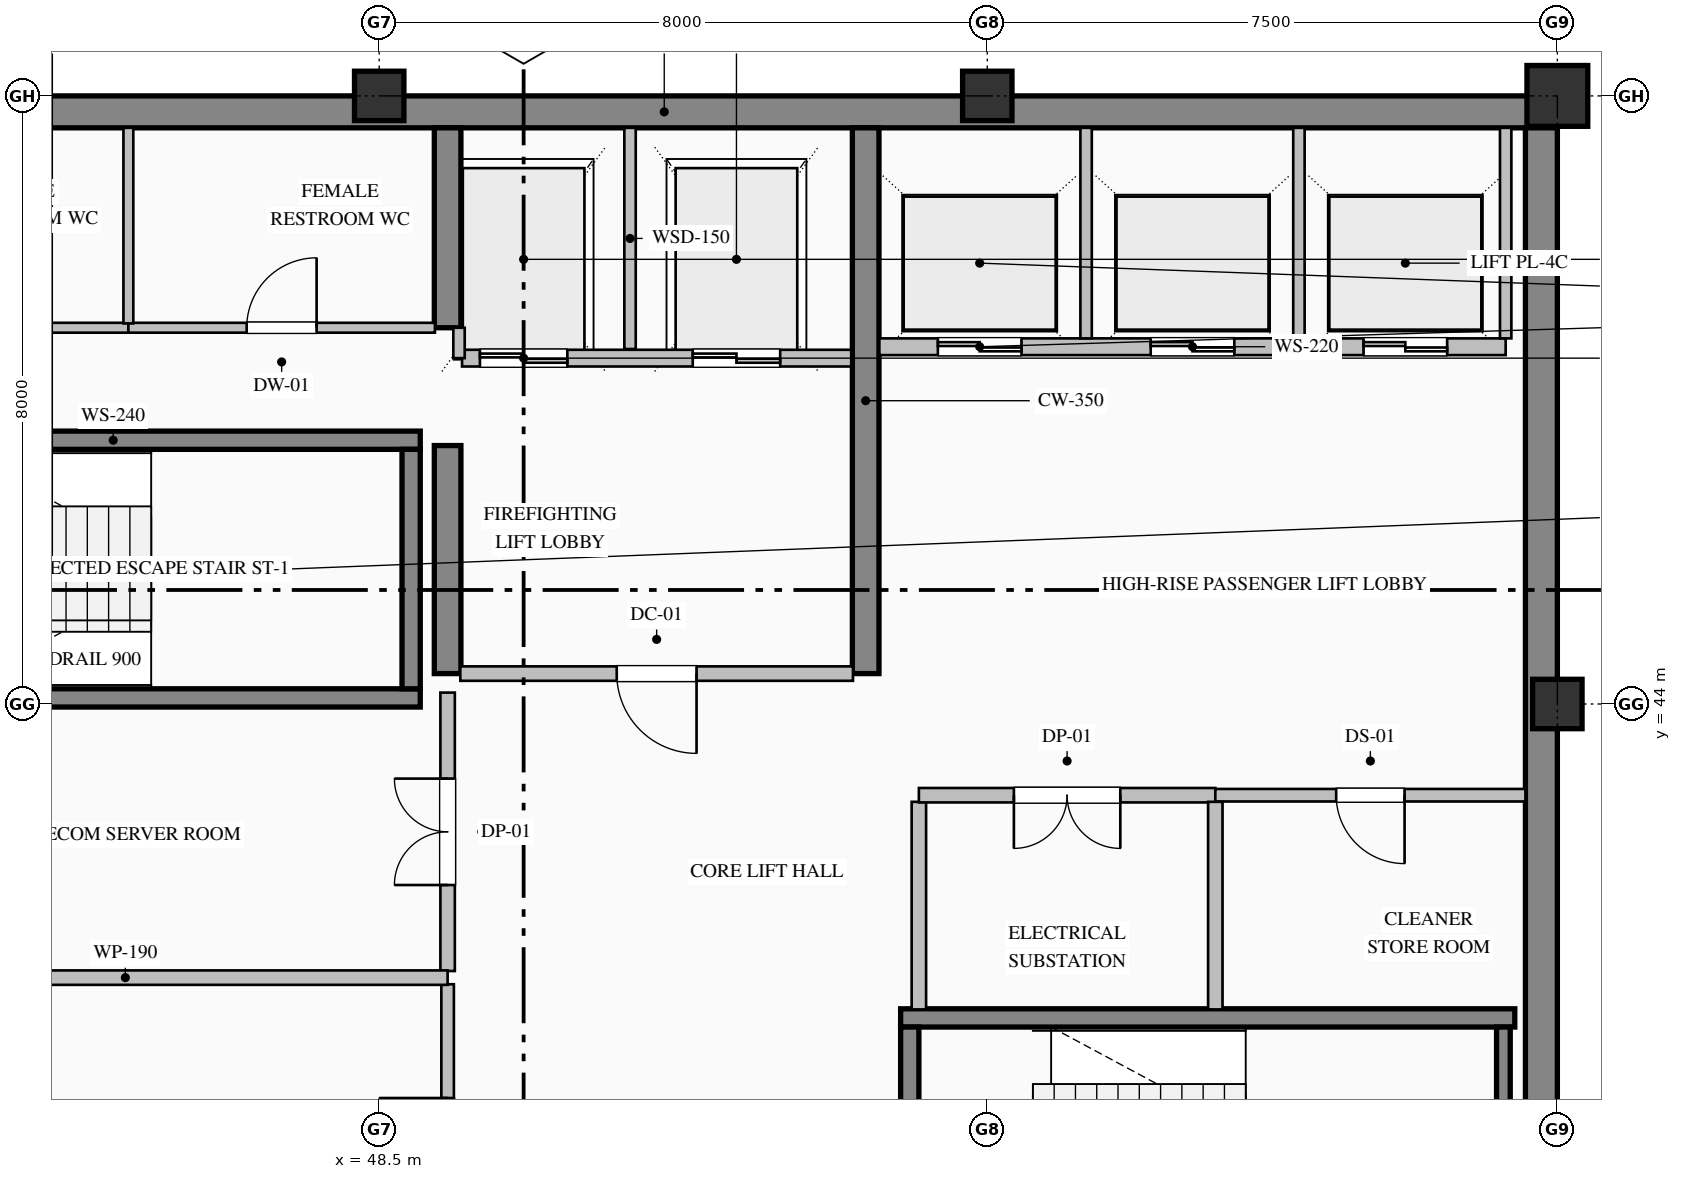
"""IFC4 building model, lengths in metres.
Left out: names, types, materials, properties, quantities, classifications, styles, units other than length and angle.
Written with IfcOpenShell. Run it as: python <this file> out.ifc"""

import sys

from ifc_helpers import new_model, si_unit, direction, frame, frame_2d, origin, origin_2d, place, context, subcontext, project, spatial, rectangle, hollow_rectangle, extrude, element, fill, save


model = new_model("IFC4")
c1 = context("Model", 3, precision=1e-05, world=origin(), true_north=direction((0.0, 1.0)))
c2 = subcontext(c1, "Body", "Model", "MODEL_VIEW")
j1 = project(units=[si_unit("LENGTHUNIT", "METRE"), si_unit("PLANEANGLEUNIT", "RADIAN")], contexts=[c1])
p1 = place(None, origin())
s1 = spatial("IfcSite", under=j1, at=p1, CompositionType="ELEMENT")
p2 = place(p1, origin())
s2 = spatial("IfcBuilding", under=s1, at=p2, CompositionType="ELEMENT")
p3 = place(p2, frame((0.0, 0.0, 347.2)))
s3 = spatial("IfcBuildingStorey", under=s2, at=p3, CompositionType="ELEMENT", Elevation=347.2)
p4 = place(p3, frame((40.5, 51.79, 0.0), z_axis=(0.0, 0.0, 1.0), x_axis=(1.0, 0.0, 0.0)))
e1 = element("IfcWall", 1, at=p4, inside=s3, PredefinedType="SHEAR", context=c2, shape_type="SweptSolid", body=[
    extrude(rectangle(XDim=23.5, YDim=0.42, at=frame_2d((11.75, 0.0))), origin(), (0.0, 0.0, 1.0), 3.785),
])
p5 = place(p3, frame((63.79, 36.32, 0.0), z_axis=(0.0, 0.0, 1.0), x_axis=(0.0, 1.0, 0.0)))
e2 = element("IfcWall", 2, at=p5, inside=s3, PredefinedType="SHEAR", context=c2, shape_type="SweptSolid", body=[
    extrude(rectangle(XDim=15.26, YDim=0.42, at=frame_2d((7.63, 0.0))), origin(), (0.0, 0.0, 1.0), 3.785),
])
p6 = place(p3, frame((49.4, 44.4, 0.0), z_axis=(0.0, 0.0, 1.0), x_axis=(0.0, 1.0, 0.0)))
e3 = element("IfcWall", 3, at=p6, inside=s3, PredefinedType="SHEAR", context=c2, shape_type="SweptSolid", body=[
    extrude(rectangle(XDim=3.0, YDim=0.35, at=frame_2d((1.5, 0.0))), origin(), (0.0, 0.0, 1.0), 3.785),
])
p7 = place(p3, frame((49.4, 48.95, 0.0), z_axis=(0.0, 0.0, 1.0), x_axis=(0.0, 1.0, 0.0)))
e4 = element("IfcWall", 4, at=p7, inside=s3, PredefinedType="SHEAR", context=c2, shape_type="SweptSolid", body=[
    extrude(rectangle(XDim=2.63, YDim=0.35, at=frame_2d((1.315, 0.0))), origin(), (0.0, 0.0, 1.0), 3.785),
])
p8 = place(p3, frame((54.9, 44.4, 0.0), z_axis=(0.0, 0.0, 1.0), x_axis=(0.0, 1.0, 0.0)))
e5 = element("IfcWall", 5, at=p8, inside=s3, PredefinedType="SHEAR", context=c2, shape_type="SweptSolid", body=[
    extrude(rectangle(XDim=7.18, YDim=0.35, at=frame_2d((3.59, 0.0))), origin(), (0.0, 0.0, 1.0), 3.785),
])
for number, where, z_axis, x_axis in (
    (6, (48.5, 52.0, 0.0), (0.0, 0.0, 1.0), (1.0, 0.0, 0.0)),
    (7, (56.5, 52.0, 0.0), (0.0, 0.0, 1.0), (1.0, 0.0, 0.0)),
    (8, (64.0, 44.0, 0.0), (0.0, 0.0, 1.0), (1.0, 0.0, 0.0)),
):
    element("IfcColumn", number, at=place(p3, frame(where, z_axis=z_axis, x_axis=x_axis)), inside=s3, PredefinedType="COLUMN", context=c2, shape_type="SweptSolid", body=[
        extrude(hollow_rectangle(XDim=0.65, YDim=0.65, WallThickness=0.028, at=origin_2d()), origin(), (0.0, 0.0, 1.0), 4.0),
    ])
p9 = place(p3, frame((64.0, 52.0, 0.0), z_axis=(0.0, 0.0, 1.0), x_axis=(1.0, 0.0, 0.0)))
e9 = element("IfcColumn", 9, at=p9, inside=s3, PredefinedType="COLUMN", context=c2, shape_type="SweptSolid", body=[
    extrude(hollow_rectangle(XDim=0.8, YDim=0.8, WallThickness=0.032, at=origin_2d()), origin(), (0.0, 0.0, 1.0), 4.0),
])
for number, where, z_axis, x_axis in (
    (10, (40.96, 47.47, 0.0), (0.0, 0.0, 1.0), (1.0, 0.0, 0.0)),
    (11, (49.04, 44.08, 0.0), (0.0, 0.0, 1.0), (-1.0, 0.0, 0.0)),
):
    element("IfcWall", number, at=place(p3, frame(where, z_axis=z_axis, x_axis=x_axis)), inside=s3, PredefinedType="SOLIDWALL", context=c2, shape_type="SweptSolid", body=[
        extrude(rectangle(XDim=8.08, YDim=0.24, at=frame_2d((4.04, 0.0))), origin(), (0.0, 0.0, 1.0), 4.0),
    ])
p10 = place(p3, frame((48.92, 44.2, 0.0), z_axis=(0.0, 0.0, 1.0), x_axis=(0.0, 1.0, 0.0)))
e12 = element("IfcWall", 12, at=p10, inside=s3, PredefinedType="SOLIDWALL", context=c2, shape_type="SweptSolid", body=[
    extrude(rectangle(XDim=3.15, YDim=0.24, at=frame_2d((1.575, 0.0))), origin(), (0.0, 0.0, 1.0), 4.0),
])
p11 = place(p3, frame((55.36, 39.87, 0.0), z_axis=(0.0, 0.0, 1.0), x_axis=(1.0, 0.0, 0.0)))
e13 = element("IfcWall", 13, at=p11, inside=s3, PredefinedType="SOLIDWALL", context=c2, shape_type="SweptSolid", body=[
    extrude(rectangle(XDim=8.08, YDim=0.24, at=frame_2d((4.04, 0.0))), origin(), (0.0, 0.0, 1.0), 4.0),
])
p12 = place(p3, frame((55.48, 39.75, 0.0), z_axis=(0.0, 0.0, 1.0), x_axis=(0.0, -1.0, 0.0)))
e14 = element("IfcWall", 14, at=p12, inside=s3, PredefinedType="SOLIDWALL", context=c2, shape_type="SweptSolid", body=[
    extrude(rectangle(XDim=3.15, YDim=0.24, at=frame_2d((1.575, 0.0))), origin(), (0.0, 0.0, 1.0), 4.0),
])
p13 = place(p12, frame((1.0, 0.0, 0.0)))
e15 = element("IfcOpeningElement", 15, at=p13, cuts=e14, PredefinedType="OPENING", context=c2, shape_type="SweptSolid", body=[
    extrude(rectangle(XDim=1.15, YDim=2.2, at=frame_2d((0.575, 1.1))), frame((0.0, 0.13, 0.0), z_axis=(0.0, -1.0, 0.0), x_axis=(1.0, 0.0, 0.0)), (0.0, 0.0, 1.0), 0.26),
])
p14 = place(p3, frame((63.29, 36.6, 0.0), z_axis=(0.0, 0.0, 1.0), x_axis=(0.0, 1.0, 0.0)))
e16 = element("IfcWall", 16, at=p14, inside=s3, PredefinedType="SOLIDWALL", context=c2, shape_type="SweptSolid", body=[
    extrude(rectangle(XDim=3.15, YDim=0.18, at=frame_2d((1.575, 0.0))), origin(), (0.0, 0.0, 1.0), 4.0),
])
p15 = place(p3, frame((54.71, 48.55, 0.0), z_axis=(0.0, 0.0, 1.0), x_axis=(-1.0, 0.0, 0.0)))
e17 = element("IfcWall", 17, at=p15, inside=s3, PredefinedType="PARTITIONING", context=c2, shape_type="SweptSolid", body=[
    extrude(rectangle(XDim=5.12, YDim=0.22, at=frame_2d((2.56, 0.0))), origin(), (0.0, 0.0, 1.0), 3.785),
])
p16 = place(p15, frame((3.735, 0.0, 0.0)))
e18 = element("IfcOpeningElement", 18, at=p16, cuts=e17, PredefinedType="OPENING", context=c2, shape_type="SweptSolid", body=[
    extrude(rectangle(XDim=1.15, YDim=2.2, at=frame_2d((0.575, 1.1))), frame((0.0, 0.12, 0.0), z_axis=(0.0, -1.0, 0.0), x_axis=(1.0, 0.0, 0.0)), (0.0, 0.0, 1.0), 0.24),
])
p17 = place(p15, frame((0.935, 0.0, 0.0)))
e19 = element("IfcOpeningElement", 19, at=p17, cuts=e17, PredefinedType="OPENING", context=c2, shape_type="SweptSolid", body=[
    extrude(rectangle(XDim=1.15, YDim=2.2, at=frame_2d((0.575, 1.1))), frame((0.0, 0.12, 0.0), z_axis=(0.0, -1.0, 0.0), x_axis=(1.0, 0.0, 0.0)), (0.0, 0.0, 1.0), 0.24),
])
p18 = place(p3, frame((51.8, 48.67, 0.0), z_axis=(0.0, 0.0, 1.0), x_axis=(0.0, 1.0, 0.0)))
e20 = element("IfcWall", 20, at=p18, inside=s3, PredefinedType="PARTITIONING", context=c2, shape_type="SweptSolid", body=[
    extrude(rectangle(XDim=2.91, YDim=0.15, at=frame_2d((1.455, 0.0))), origin(), (0.0, 0.0, 1.0), 3.785),
])
p19 = place(p3, frame((49.55, 48.55, 0.0), z_axis=(0.0, 0.0, 1.0), x_axis=(0.0, 1.0, 0.0)))
e21 = element("IfcWall", 21, at=p19, inside=s3, PredefinedType="PARTITIONING", context=c2, shape_type="SweptSolid", body=[
    extrude(rectangle(XDim=0.4, YDim=0.15, at=frame_2d((0.2, 0.0))), origin(), (0.0, 0.0, 1.0), 3.785),
])
p20 = place(p3, frame((63.32, 48.7, 0.0), z_axis=(0.0, 0.0, 1.0), x_axis=(-1.0, 0.0, 0.0)))
e22 = element("IfcWall", 22, at=p20, inside=s3, PredefinedType="PARTITIONING", context=c2, shape_type="SweptSolid", body=[
    extrude(rectangle(XDim=8.24, YDim=0.22, at=frame_2d((4.12, 0.0))), origin(), (0.0, 0.0, 1.0), 3.785),
])
p21 = place(p20, frame((6.37, 0.0, 0.0)))
e23 = element("IfcOpeningElement", 23, at=p21, cuts=e22, PredefinedType="OPENING", context=c2, shape_type="SweptSolid", body=[
    extrude(rectangle(XDim=1.1, YDim=2.2, at=frame_2d((0.55, 1.1))), frame((0.0, 0.12, 0.0), z_axis=(0.0, -1.0, 0.0), x_axis=(1.0, 0.0, 0.0)), (0.0, 0.0, 1.0), 0.24),
])
p22 = place(p20, frame((3.57, 0.0, 0.0)))
e24 = element("IfcOpeningElement", 24, at=p22, cuts=e22, PredefinedType="OPENING", context=c2, shape_type="SweptSolid", body=[
    extrude(rectangle(XDim=1.1, YDim=2.2, at=frame_2d((0.55, 1.1))), frame((0.0, 0.12, 0.0), z_axis=(0.0, -1.0, 0.0), x_axis=(1.0, 0.0, 0.0)), (0.0, 0.0, 1.0), 0.24),
])
p23 = place(p20, frame((0.77, 0.0, 0.0)))
e25 = element("IfcOpeningElement", 25, at=p23, cuts=e22, PredefinedType="OPENING", context=c2, shape_type="SweptSolid", body=[
    extrude(rectangle(XDim=1.1, YDim=2.2, at=frame_2d((0.55, 1.1))), frame((0.0, 0.12, 0.0), z_axis=(0.0, -1.0, 0.0), x_axis=(1.0, 0.0, 0.0)), (0.0, 0.0, 1.0), 0.24),
])
for number, where, z_axis, x_axis in (
    (26, (57.8, 48.81, 0.0), (0.0, 0.0, 1.0), (0.0, 1.0, 0.0)),
    (27, (60.6, 48.81, 0.0), (0.0, 0.0, 1.0), (0.0, 1.0, 0.0)),
    (28, (63.32, 48.81, 0.0), (0.0, 0.0, 1.0), (0.0, 1.0, 0.0)),
):
    element("IfcWall", number, at=place(p3, frame(where, z_axis=z_axis, x_axis=x_axis)), inside=s3, PredefinedType="PARTITIONING", context=c2, shape_type="SweptSolid", body=[
        extrude(rectangle(XDim=2.77, YDim=0.15, at=frame_2d((1.385, 0.0))), origin(), (0.0, 0.0, 1.0), 3.785),
    ])
p24 = place(p3, frame((40.92, 48.95, 0.0), z_axis=(0.0, 0.0, 1.0), x_axis=(1.0, 0.0, 0.0)))
e29 = element("IfcWall", 29, at=p24, inside=s3, PredefinedType="PARTITIONING", context=c2, shape_type="SweptSolid", body=[
    extrude(rectangle(XDim=4.28, YDim=0.13, at=frame_2d((2.14, 0.0))), origin(), (0.0, 0.0, 1.0), 3.785),
])
p25 = place(p24, frame((1.68, 0.0, 0.0)))
e30 = element("IfcOpeningElement", 30, at=p25, cuts=e29, PredefinedType="OPENING", context=c2, shape_type="SweptSolid", body=[
    extrude(rectangle(XDim=0.92, YDim=2.15, at=frame_2d((0.46, 1.075))), frame((0.0, 0.075, 0.0), z_axis=(0.0, -1.0, 0.0), x_axis=(1.0, 0.0, 0.0)), (0.0, 0.0, 1.0), 0.15),
])
p26 = place(p3, frame((45.2, 48.95, 0.0), z_axis=(0.0, 0.0, 1.0), x_axis=(1.0, 0.0, 0.0)))
e31 = element("IfcWall", 31, at=p26, inside=s3, PredefinedType="PARTITIONING", context=c2, shape_type="SweptSolid", body=[
    extrude(rectangle(XDim=4.033, YDim=0.13, at=frame_2d((2.017, 0.0))), origin(), (0.0, 0.0, 1.0), 3.785),
])
p27 = place(p26, frame((1.556, 0.0, 0.0)))
e32 = element("IfcOpeningElement", 32, at=p27, cuts=e31, PredefinedType="OPENING", context=c2, shape_type="SweptSolid", body=[
    extrude(rectangle(XDim=0.92, YDim=2.15, at=frame_2d((0.46, 1.075))), frame((0.0, 0.075, 0.0), z_axis=(0.0, -1.0, 0.0), x_axis=(1.0, 0.0, 0.0)), (0.0, 0.0, 1.0), 0.15),
])
p28 = place(p3, frame((54.733, 44.4, 0.0), z_axis=(0.0, 0.0, 1.0), x_axis=(-1.0, 0.0, 0.0)))
e33 = element("IfcWall", 33, at=p28, inside=s3, PredefinedType="PARTITIONING", context=c2, shape_type="SweptSolid", body=[
    extrude(rectangle(XDim=5.166, YDim=0.19, at=frame_2d((2.583, 0.0))), origin(), (0.0, 0.0, 1.0), 3.785),
])
p29 = place(p28, frame((2.058, 0.0, 0.0)))
e34 = element("IfcOpeningElement", 34, at=p29, cuts=e33, PredefinedType="OPENING", context=c2, shape_type="SweptSolid", body=[
    extrude(rectangle(XDim=1.05, YDim=2.15, at=frame_2d((0.525, 1.075))), frame((0.0, 0.105, 0.0), z_axis=(0.0, -1.0, 0.0), x_axis=(1.0, 0.0, 0.0)), (0.0, 0.0, 1.0), 0.21),
])
p30 = place(p3, frame((49.4, 36.42, 0.0), z_axis=(0.0, 0.0, 1.0), x_axis=(0.0, 1.0, 0.0)))
e35 = element("IfcWall", 35, at=p30, inside=s3, PredefinedType="PARTITIONING", context=c2, shape_type="SweptSolid", body=[
    extrude(rectangle(XDim=3.893, YDim=0.165, at=frame_2d((1.947, 0.0))), origin(), (0.0, 0.0, 1.0), 3.027),
])
p31 = place(p30, frame((1.497, 0.0, 0.0)))
e36 = element("IfcOpeningElement", 36, at=p31, cuts=e35, PredefinedType="OPENING", context=c2, shape_type="SweptSolid", body=[
    extrude(rectangle(XDim=0.9, YDim=2.15, at=frame_2d((0.45, 1.075))), frame((0.0, 0.093, 0.0), z_axis=(0.0, -1.0, 0.0), x_axis=(1.0, 0.0, 0.0)), (0.0, 0.0, 1.0), 0.185),
])
p32 = place(p3, frame((49.4, 40.487, 0.0), z_axis=(0.0, 0.0, 1.0), x_axis=(0.0, 1.0, 0.0)))
e37 = element("IfcWall", 37, at=p32, inside=s3, PredefinedType="PARTITIONING", context=c2, shape_type="SweptSolid", body=[
    extrude(rectangle(XDim=3.663, YDim=0.19, at=frame_2d((1.832, 0.0))), origin(), (0.0, 0.0, 1.0), 3.027),
])
p33 = place(p32, frame((1.132, 0.0, 0.0)))
e38 = element("IfcOpeningElement", 38, at=p33, cuts=e37, PredefinedType="OPENING", context=c2, shape_type="SweptSolid", body=[
    extrude(rectangle(XDim=1.4, YDim=2.25, at=frame_2d((0.7, 1.125))), frame((0.0, 0.105, 0.0), z_axis=(0.0, -1.0, 0.0), x_axis=(1.0, 0.0, 0.0)), (0.0, 0.0, 1.0), 0.21),
])
p34 = place(p3, frame((55.6, 42.713, 0.0), z_axis=(0.0, 0.0, 1.0), x_axis=(0.0, -1.0, 0.0)))
e39 = element("IfcWall", 39, at=p34, inside=s3, PredefinedType="PARTITIONING", context=c2, shape_type="SweptSolid", body=[
    extrude(rectangle(XDim=2.731, YDim=0.19, at=frame_2d((1.365, 0.0))), origin(), (0.0, 0.0, 1.0), 3.785),
])
p35 = place(p3, frame((40.92, 40.4, 0.0), z_axis=(0.0, 0.0, 1.0), x_axis=(1.0, 0.0, 0.0)))
e40 = element("IfcWall", 40, at=p35, inside=s3, PredefinedType="PARTITIONING", context=c2, shape_type="SweptSolid", body=[
    extrude(rectangle(XDim=8.48, YDim=0.19, at=frame_2d((4.24, 0.0))), origin(), (0.0, 0.0, 1.0), 3.785),
])
p36 = place(p3, frame((59.5, 42.8, 0.0), z_axis=(0.0, 0.0, 1.0), x_axis=(-1.0, 0.0, 0.0)))
e41 = element("IfcWall", 41, at=p36, inside=s3, PredefinedType="PARTITIONING", context=c2, shape_type="SweptSolid", body=[
    extrude(rectangle(XDim=3.9, YDim=0.19, at=frame_2d((1.95, 0.0))), origin(), (0.0, 0.0, 1.0), 3.785),
])
p37 = place(p36, frame((1.25, 0.0, 0.0)))
e42 = element("IfcOpeningElement", 42, at=p37, cuts=e41, PredefinedType="OPENING", context=c2, shape_type="SweptSolid", body=[
    extrude(rectangle(XDim=1.4, YDim=2.25, at=frame_2d((0.7, 1.125))), frame((0.0, 0.105, 0.0), z_axis=(0.0, -1.0, 0.0), x_axis=(1.0, 0.0, 0.0)), (0.0, 0.0, 1.0), 0.21),
])
p38 = place(p3, frame((63.58, 42.8, 0.0), z_axis=(0.0, 0.0, 1.0), x_axis=(-1.0, 0.0, 0.0)))
e43 = element("IfcWall", 43, at=p38, inside=s3, PredefinedType="PARTITIONING", context=c2, shape_type="SweptSolid", body=[
    extrude(rectangle(XDim=4.08, YDim=0.165, at=frame_2d((2.04, 0.0))), origin(), (0.0, 0.0, 1.0), 3.785),
])
p39 = place(p38, frame((1.59, 0.0, 0.0)))
e44 = element("IfcOpeningElement", 44, at=p39, cuts=e43, PredefinedType="OPENING", context=c2, shape_type="SweptSolid", body=[
    extrude(rectangle(XDim=0.9, YDim=2.15, at=frame_2d((0.45, 1.075))), frame((0.0, 0.093, 0.0), z_axis=(0.0, -1.0, 0.0), x_axis=(1.0, 0.0, 0.0)), (0.0, 0.0, 1.0), 0.185),
])
p40 = place(p3, frame((45.2, 51.58, 0.0), z_axis=(0.0, 0.0, 1.0), x_axis=(0.0, -1.0, 0.0)))
e45 = element("IfcWall", 45, at=p40, inside=s3, PredefinedType="PARTITIONING", context=c2, shape_type="SweptSolid", body=[
    extrude(rectangle(XDim=2.573, YDim=0.13, at=frame_2d((1.287, 0.0))), origin(), (0.0, 0.0, 1.0), 3.785),
])
p41 = place(p3, frame((59.5, 42.713, 0.0), z_axis=(0.0, 0.0, 1.0), x_axis=(0.0, -1.0, 0.0)))
e46 = element("IfcWall", 46, at=p41, inside=s3, PredefinedType="PARTITIONING", context=c2, shape_type="SweptSolid", body=[
    extrude(rectangle(XDim=2.731, YDim=0.19, at=frame_2d((1.365, 0.0))), origin(), (0.0, 0.0, 1.0), 3.785),
])
p42 = place(p16, origin())
e47 = element("IfcDoor", 47, at=p42, inside=s3, OperationType="DOUBLE_DOOR_SLIDING", PredefinedType="DOOR", context=c2, shape_type="SweptSolid", body=[
    extrude(rectangle(XDim=1.15, YDim=2.2, at=frame_2d((0.575, 1.1))), frame((0.0, 0.025, 0.0), z_axis=(0.0, -1.0, 0.0), x_axis=(1.0, 0.0, 0.0)), (0.0, 0.0, 1.0), 0.05),
])
fill(e18, e47)
p43 = place(p17, origin())
e48 = element("IfcDoor", 48, at=p43, inside=s3, OperationType="DOUBLE_DOOR_SLIDING", PredefinedType="DOOR", context=c2, shape_type="SweptSolid", body=[
    extrude(rectangle(XDim=1.15, YDim=2.2, at=frame_2d((0.575, 1.1))), frame((0.0, 0.025, 0.0), z_axis=(0.0, -1.0, 0.0), x_axis=(1.0, 0.0, 0.0)), (0.0, 0.0, 1.0), 0.05),
])
fill(e19, e48)
p44 = place(p21, origin())
e49 = element("IfcDoor", 49, at=p44, inside=s3, OperationType="DOUBLE_DOOR_SLIDING", PredefinedType="DOOR", context=c2, shape_type="SweptSolid", body=[
    extrude(rectangle(XDim=1.1, YDim=2.2, at=frame_2d((0.55, 1.1))), frame((0.0, 0.025, 0.0), z_axis=(0.0, -1.0, 0.0), x_axis=(1.0, 0.0, 0.0)), (0.0, 0.0, 1.0), 0.05),
])
fill(e23, e49)
p45 = place(p22, origin())
e50 = element("IfcDoor", 50, at=p45, inside=s3, OperationType="DOUBLE_DOOR_SLIDING", PredefinedType="DOOR", context=c2, shape_type="SweptSolid", body=[
    extrude(rectangle(XDim=1.1, YDim=2.2, at=frame_2d((0.55, 1.1))), frame((0.0, 0.025, 0.0), z_axis=(0.0, -1.0, 0.0), x_axis=(1.0, 0.0, 0.0)), (0.0, 0.0, 1.0), 0.05),
])
fill(e24, e50)
p46 = place(p23, origin())
e51 = element("IfcDoor", 51, at=p46, inside=s3, OperationType="DOUBLE_DOOR_SLIDING", PredefinedType="DOOR", context=c2, shape_type="SweptSolid", body=[
    extrude(rectangle(XDim=1.1, YDim=2.2, at=frame_2d((0.55, 1.1))), frame((0.0, 0.025, 0.0), z_axis=(0.0, -1.0, 0.0), x_axis=(1.0, 0.0, 0.0)), (0.0, 0.0, 1.0), 0.05),
])
fill(e25, e51)
p47 = place(p29, origin())
e52 = element("IfcDoor", 52, at=p47, inside=s3, OperationType="SINGLE_SWING_LEFT", PredefinedType="DOOR", context=c2, shape_type="SweptSolid", body=[
    extrude(rectangle(XDim=1.05, YDim=2.15, at=frame_2d((0.525, 1.075))), frame((0.0, 0.025, 0.0), z_axis=(0.0, -1.0, 0.0), x_axis=(1.0, 0.0, 0.0)), (0.0, 0.0, 1.0), 0.05),
])
fill(e34, e52)
p48 = place(p31, origin())
e53 = element("IfcDoor", 53, at=p48, inside=s3, OperationType="SINGLE_SWING_RIGHT", PredefinedType="DOOR", context=c2, shape_type="SweptSolid", body=[
    extrude(rectangle(XDim=0.9, YDim=2.15, at=frame_2d((0.45, 1.075))), frame((0.0, 0.025, 0.0), z_axis=(0.0, -1.0, 0.0), x_axis=(1.0, 0.0, 0.0)), (0.0, 0.0, 1.0), 0.05),
])
fill(e36, e53)
p49 = place(p33, origin())
e54 = element("IfcDoor", 54, at=p49, inside=s3, OperationType="DOUBLE_DOOR_SINGLE_SWING", PredefinedType="DOOR", context=c2, shape_type="SweptSolid", body=[
    extrude(rectangle(XDim=1.4, YDim=2.25, at=frame_2d((0.7, 1.125))), frame((0.0, 0.025, 0.0), z_axis=(0.0, -1.0, 0.0), x_axis=(1.0, 0.0, 0.0)), (0.0, 0.0, 1.0), 0.05),
])
fill(e38, e54)
p50 = place(p27, origin())
e55 = element("IfcDoor", 55, at=p50, inside=s3, OperationType="SINGLE_SWING_RIGHT", PredefinedType="DOOR", context=c2, shape_type="SweptSolid", body=[
    extrude(rectangle(XDim=0.92, YDim=2.15, at=frame_2d((0.46, 1.075))), frame((0.0, 0.025, 0.0), z_axis=(0.0, -1.0, 0.0), x_axis=(1.0, 0.0, 0.0)), (0.0, 0.0, 1.0), 0.05),
])
fill(e32, e55)
p51 = place(p37, origin())
e56 = element("IfcDoor", 56, at=p51, inside=s3, OperationType="DOUBLE_DOOR_SINGLE_SWING", PredefinedType="DOOR", context=c2, shape_type="SweptSolid", body=[
    extrude(rectangle(XDim=1.4, YDim=2.25, at=frame_2d((0.7, 1.125))), frame((0.0, 0.025, 0.0), z_axis=(0.0, -1.0, 0.0), x_axis=(1.0, 0.0, 0.0)), (0.0, 0.0, 1.0), 0.05),
])
fill(e42, e56)
p52 = place(p39, origin())
e57 = element("IfcDoor", 57, at=p52, inside=s3, OperationType="SINGLE_SWING_LEFT", PredefinedType="DOOR", context=c2, shape_type="SweptSolid", body=[
    extrude(rectangle(XDim=0.9, YDim=2.15, at=frame_2d((0.45, 1.075))), frame((0.0, 0.025, 0.0), z_axis=(0.0, -1.0, 0.0), x_axis=(1.0, 0.0, 0.0)), (0.0, 0.0, 1.0), 0.05),
])
fill(e44, e57)
save(model, sys.argv[1])
